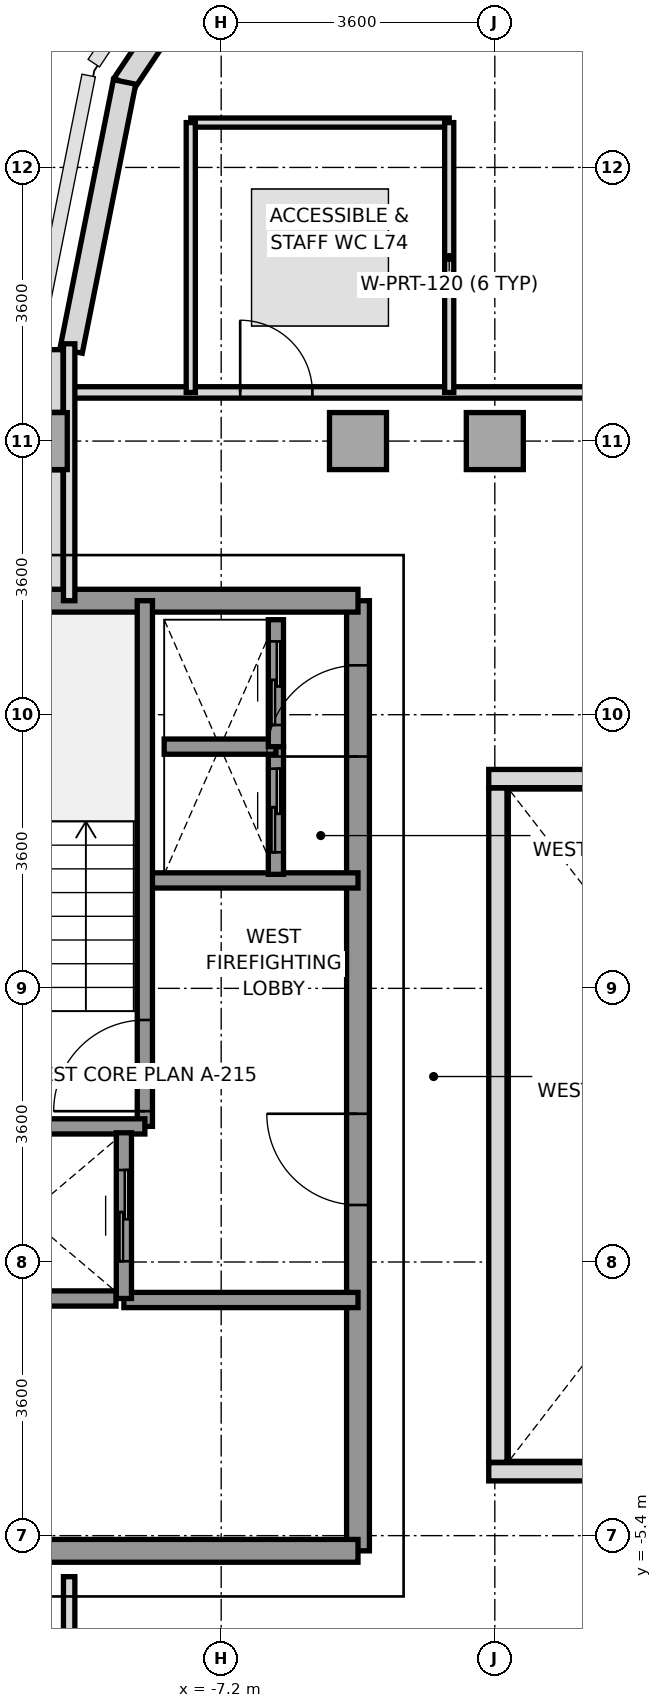
"""IFC4 building model, lengths in metres.
Left out: names, types, materials, properties, quantities, classifications, styles, units other than length and angle.
Written with IfcOpenShell. Run it as: python <this file> out.ifc"""

import sys

from ifc_helpers import new_model, si_unit, direction, frame, frame_2d, origin, origin_2d, place, context, subcontext, project, spatial, rectangle, extrude, source, transform, mapped, element, fill, save


model = new_model("IFC4")
c1 = context("Model", 3, precision=1e-05, world=origin(), true_north=direction((0.0, 1.0)))
c2 = subcontext(c1, "Body", "Model", "MODEL_VIEW")
j1 = project(units=[si_unit("LENGTHUNIT", "METRE"), si_unit("PLANEANGLEUNIT", "RADIAN")], contexts=[c1])
p1 = place(None, origin())
s1 = spatial("IfcSite", under=j1, at=p1, CompositionType="ELEMENT")
p2 = place(p1, origin())
s2 = spatial("IfcBuilding", under=s1, at=p2, CompositionType="ELEMENT")
p3 = place(p2, frame((0.0, 0.0, 265.2)))
s3 = spatial("IfcBuildingStorey", under=s2, at=p3, CompositionType="ELEMENT", Elevation=265.2)
m1 = source(origin(), c2, "Body", "SweptSolid", [
    extrude(rectangle(XDim=0.75, YDim=0.75, at=origin_2d()), origin(), (0.0, 0.0, 1.0), 3.01),
])
for number, where, z_axis, x_axis in (
    (1, (-9.6, 9.0, 0.0), (0.0, 0.0, 1.0), (1.0, 0.0, 0.0)),
    (2, (-5.4, 9.0, 0.0), (0.0, 0.0, 1.0), (1.0, 0.0, 0.0)),
    (3, (-3.6, 9.0, 0.0), (0.0, 0.0, 1.0), (1.0, 0.0, 0.0)),
):
    element("IfcColumn", number, at=place(p3, frame(where, z_axis=z_axis, x_axis=x_axis)), inside=s3, PredefinedType="COLUMN", context=c2, shape_type="MappedRepresentation", body=[
        mapped(m1, transform((0.0, 0.0, 0.0), x_axis=(1.0, 0.0, 0.0), y_axis=(0.0, 1.0, 0.0), z_axis=(0.0, 0.0, 1.0), scale=1.0)),
    ])
p4 = place(p3, frame((-7.305, 15.458, 0.0), z_axis=(0.0, 0.0, 1.0), x_axis=(-0.555604299396, -0.831446848868, 0.0)))
e4 = element("IfcWall", 4, at=p4, inside=s3, PredefinedType="SOLIDWALL", context=c2, shape_type="SweptSolid", body=[
    extrude(rectangle(XDim=2.118, YDim=0.3, at=frame_2d((1.059, 0.0))), origin(), (0.0, 0.0, 1.0), 2.61),
])
p5 = place(p3, frame((-8.471, 13.725, 0.0), z_axis=(0.0, 0.0, 1.0), x_axis=(-0.195114232679, -0.980780523974, 0.0)))
e5 = element("IfcWall", 5, at=p5, inside=s3, PredefinedType="SOLIDWALL", context=c2, shape_type="SweptSolid", body=[
    extrude(rectangle(XDim=3.609, YDim=0.3, at=frame_2d((1.804, 0.0))), origin(), (0.0, 0.0, 1.0), 3.01),
])
p6 = place(p3, frame((-9.4, 6.953, 0.0), z_axis=(0.0, 0.0, 1.0), x_axis=(0.0, 1.0, 0.0)))
e6 = element("IfcWall", 6, at=p6, inside=s3, PredefinedType="PARAPET", context=c2, shape_type="SweptSolid", body=[
    extrude(rectangle(XDim=1.669, YDim=0.24, at=frame_2d((0.834, 0.0))), origin(), (0.0, 0.0, 1.0), 1.15),
])
p7 = place(p3, frame((-9.4, 9.378, 0.0), z_axis=(0.0, 0.0, 1.0), x_axis=(0.0, 1.0, 0.0)))
e7 = element("IfcWall", 7, at=p7, inside=s3, PredefinedType="PARAPET", context=c2, shape_type="SweptSolid", body=[
    extrude(rectangle(XDim=0.825, YDim=0.24, at=frame_2d((0.413, 0.0))), origin(), (0.0, 0.0, 1.0), 1.15),
])
p8 = place(p3, frame((-5.4, -5.6, 0.0), z_axis=(0.0, 0.0, 1.0), x_axis=(0.0, 1.0, 0.0)))
e8 = element("IfcWall", 8, at=p8, inside=s3, PredefinedType="SHEAR", context=c2, shape_type="SweptSolid", body=[
    extrude(rectangle(XDim=12.5, YDim=0.3, at=frame_2d((6.25, 0.0))), origin(), (0.0, 0.0, 1.0), 3.01),
])
p9 = place(p8, frame((4.55, 0.0, 0.0)))
e9 = element("IfcOpeningElement", 9, at=p9, cuts=e8, PredefinedType="OPENING", context=c2, shape_type="SweptSolid", body=[
    extrude(rectangle(XDim=1.2, YDim=2.2, at=frame_2d((0.6, 1.1))), frame((0.0, 0.16, 0.0), z_axis=(0.0, -1.0, 0.0), x_axis=(1.0, 0.0, 0.0)), (0.0, 0.0, 1.0), 0.32),
])
p10 = place(p8, frame((10.45, 0.0, 0.0)))
e10 = element("IfcOpeningElement", 10, at=p10, cuts=e8, PredefinedType="OPENING", context=c2, shape_type="SweptSolid", body=[
    extrude(rectangle(XDim=1.2, YDim=2.2, at=frame_2d((0.6, 1.1))), frame((0.0, 0.16, 0.0), z_axis=(0.0, -1.0, 0.0), x_axis=(1.0, 0.0, 0.0)), (0.0, 0.0, 1.0), 0.32),
])
p11 = place(p3, frame((-11.356, 6.9, 0.0), z_axis=(0.0, 0.0, 1.0), x_axis=(1.0, 0.0, 0.0)))
e11 = element("IfcWall", 11, at=p11, inside=s3, PredefinedType="SHEAR", context=c2, shape_type="SweptSolid", body=[
    extrude(rectangle(XDim=5.956, YDim=0.3, at=frame_2d((2.978, 0.0))), origin(), (0.0, 0.0, 1.0), 3.01),
])
p12 = place(p3, frame((-13.2, -5.6, 0.0), z_axis=(0.0, 0.0, 1.0), x_axis=(1.0, 0.0, 0.0)))
e12 = element("IfcWall", 12, at=p12, inside=s3, PredefinedType="SHEAR", context=c2, shape_type="SweptSolid", body=[
    extrude(rectangle(XDim=7.8, YDim=0.3, at=frame_2d((3.9, 0.0))), origin(), (0.0, 0.0, 1.0), 3.01),
])
p13 = place(p3, frame((-8.18, 3.22, 0.0), z_axis=(0.0, 0.0, 1.0), x_axis=(1.0, 0.0, 0.0)))
e13 = element("IfcWall", 13, at=p13, inside=s3, PredefinedType="SOLIDWALL", context=c2, shape_type="SweptSolid", body=[
    extrude(rectangle(XDim=2.78, YDim=0.2, at=frame_2d((1.39, 0.0))), origin(), (0.0, 0.0, 1.0), 3.01),
])
p14 = place(p3, frame((-8.48, -2.3, 0.0), z_axis=(0.0, 0.0, 1.0), x_axis=(1.0, 0.0, 0.0)))
e14 = element("IfcWall", 14, at=p14, inside=s3, PredefinedType="SOLIDWALL", context=c2, shape_type="SweptSolid", body=[
    extrude(rectangle(XDim=3.08, YDim=0.2, at=frame_2d((1.54, 0.0))), origin(), (0.0, 0.0, 1.0), 3.01),
])
p15 = place(p3, frame((-8.204, -0.016, 0.0), z_axis=(0.0, 0.0, 1.0), x_axis=(0.0, 1.0, 0.0)))
e15 = element("IfcWall", 15, at=p15, inside=s3, PredefinedType="SOLIDWALL", context=c2, shape_type="SweptSolid", body=[
    extrude(rectangle(XDim=6.916, YDim=0.2, at=frame_2d((3.458, 0.0))), origin(), (0.0, 0.0, 1.0), 3.01),
])
p16 = place(p15, frame((0.2, 0.0, 0.0)))
e16 = element("IfcOpeningElement", 16, at=p16, cuts=e15, PredefinedType="OPENING", context=c2, shape_type="SweptSolid", body=[
    extrude(rectangle(XDim=1.2, YDim=2.2, at=frame_2d((0.6, 1.1))), frame((0.0, 0.11, 0.0), z_axis=(0.0, -1.0, 0.0), x_axis=(1.0, 0.0, 0.0)), (0.0, 0.0, 1.0), 0.22),
])
p17 = place(p3, frame((-11.356, -0.016, 0.0), z_axis=(0.0, 0.0, 1.0), x_axis=(1.0, 0.0, 0.0)))
e17 = element("IfcWall", 17, at=p17, inside=s3, PredefinedType="SOLIDWALL", context=c2, shape_type="SweptSolid", body=[
    extrude(rectangle(XDim=3.152, YDim=0.2, at=frame_2d((1.576, 0.0))), origin(), (0.0, 0.0, 1.0), 3.01),
])
p18 = place(p3, frame((-8.48, -2.28, 0.0), z_axis=(0.0, 0.0, 1.0), x_axis=(0.0, 1.0, 0.0)))
e18 = element("IfcWall", 18, at=p18, inside=s3, PredefinedType="SOLIDWALL", context=c2, shape_type="SweptSolid", body=[
    extrude(rectangle(XDim=2.18, YDim=0.2, at=frame_2d((1.09, 0.0))), origin(), (0.0, 0.0, 1.0), 3.01),
])
p19 = place(p18, frame((0.49, 0.0, 0.0)))
e19 = element("IfcOpeningElement", 19, at=p19, cuts=e18, PredefinedType="OPENING", context=c2, shape_type="SweptSolid", body=[
    extrude(rectangle(XDim=1.2, YDim=2.2, at=frame_2d((0.6, 1.1))), frame((0.0, 0.11, 0.0), z_axis=(0.0, -1.0, 0.0), x_axis=(1.0, 0.0, 0.0)), (0.0, 0.0, 1.0), 0.22),
])
p20 = place(p3, frame((-10.946, -2.28, 0.0), z_axis=(0.0, 0.0, 1.0), x_axis=(1.0, 0.0, 0.0)))
e20 = element("IfcWall", 20, at=p20, inside=s3, PredefinedType="SOLIDWALL", context=c2, shape_type="SweptSolid", body=[
    extrude(rectangle(XDim=2.362, YDim=0.2, at=frame_2d((1.181, 0.0))), origin(), (0.0, 0.0, 1.0), 3.01),
])
p21 = place(p3, frame((-6.48, 3.3, 0.0), z_axis=(0.0, 0.0, 1.0), x_axis=(0.0, 1.0, 0.0)))
e21 = element("IfcWall", 21, at=p21, inside=s3, PredefinedType="SOLIDWALL", context=c2, shape_type="SweptSolid", body=[
    extrude(rectangle(XDim=1.68, YDim=0.2, at=frame_2d((0.84, 0.0))), origin(), (0.0, 0.0, 1.0), 3.01),
])
p22 = place(p21, frame((0.29, 0.0, 0.0)))
e22 = element("IfcOpeningElement", 22, at=p22, cuts=e21, PredefinedType="OPENING", context=c2, shape_type="SweptSolid", body=[
    extrude(rectangle(XDim=1.1, YDim=2.2, at=frame_2d((0.55, 1.1))), frame((0.0, 0.11, 0.0), z_axis=(0.0, -1.0, 0.0), x_axis=(1.0, 0.0, 0.0)), (0.0, 0.0, 1.0), 0.22),
])
p23 = place(p3, frame((-7.95, 4.98, 0.0), z_axis=(0.0, 0.0, 1.0), x_axis=(1.0, 0.0, 0.0)))
e23 = element("IfcWall", 23, at=p23, inside=s3, PredefinedType="SOLIDWALL", context=c2, shape_type="SweptSolid", body=[
    extrude(rectangle(XDim=1.47, YDim=0.2, at=frame_2d((0.735, 0.0))), origin(), (0.0, 0.0, 1.0), 3.01),
])
p24 = place(p3, frame((-6.48, 4.98, 0.0), z_axis=(0.0, 0.0, 1.0), x_axis=(0.0, 1.0, 0.0)))
e24 = element("IfcWall", 24, at=p24, inside=s3, PredefinedType="SOLIDWALL", context=c2, shape_type="SweptSolid", body=[
    extrude(rectangle(XDim=1.67, YDim=0.2, at=frame_2d((0.835, 0.0))), origin(), (0.0, 0.0, 1.0), 3.01),
])
p25 = place(p24, frame((0.285, 0.0, 0.0)))
e25 = element("IfcOpeningElement", 25, at=p25, cuts=e24, PredefinedType="OPENING", context=c2, shape_type="SweptSolid", body=[
    extrude(rectangle(XDim=1.1, YDim=2.2, at=frame_2d((0.55, 1.1))), frame((0.0, 0.11, 0.0), z_axis=(0.0, -1.0, 0.0), x_axis=(1.0, 0.0, 0.0)), (0.0, 0.0, 1.0), 0.22),
])
p26 = place(p3, frame((-9.2, 9.64, 0.0), z_axis=(0.0, 0.0, 1.0), x_axis=(1.0, 0.0, 0.0)))
e26 = element("IfcWall", 26, at=p26, inside=s3, PredefinedType="PARTITIONING", context=c2, shape_type="SweptSolid", body=[
    extrude(rectangle(XDim=18.4, YDim=0.15, at=frame_2d((9.2, 0.0))), origin(), (0.0, 0.0, 1.0), 3.01),
])
p27 = place(p26, frame((2.25, 0.0, 0.0)))
e27 = element("IfcOpeningElement", 27, at=p27, cuts=e26, PredefinedType="OPENING", context=c2, shape_type="SweptSolid", body=[
    extrude(rectangle(XDim=0.95, YDim=2.15, at=frame_2d((0.475, 1.075))), frame((0.0, 0.085, 0.0), z_axis=(0.0, -1.0, 0.0), x_axis=(1.0, 0.0, 0.0)), (0.0, 0.0, 1.0), 0.17),
])
p28 = place(p26, frame((15.15, 0.0, 0.0)))
e28 = element("IfcOpeningElement", 28, at=p28, cuts=e26, PredefinedType="OPENING", context=c2, shape_type="SweptSolid", body=[
    extrude(rectangle(XDim=1.1, YDim=2.2, at=frame_2d((0.55, 1.1))), frame((0.0, 0.085, 0.0), z_axis=(0.0, -1.0, 0.0), x_axis=(1.0, 0.0, 0.0)), (0.0, 0.0, 1.0), 0.17),
])
p29 = place(p3, frame((-9.2, 6.9, 0.0), z_axis=(0.0, 0.0, 1.0), x_axis=(0.0, 1.0, 0.0)))
e29 = element("IfcWall", 29, at=p29, inside=s3, PredefinedType="PARTITIONING", context=c2, shape_type="SweptSolid", body=[
    extrude(rectangle(XDim=3.38, YDim=0.15, at=frame_2d((1.69, 0.0))), origin(), (0.0, 0.0, 1.0), 2.61),
])
p30 = place(p3, frame((-7.6, 13.19, 0.0), z_axis=(0.0, 0.0, 1.0), x_axis=(1.0, 0.0, 0.0)))
e30 = element("IfcWall", 30, at=p30, inside=s3, PredefinedType="PARTITIONING", context=c2, shape_type="SweptSolid", body=[
    extrude(rectangle(XDim=3.4, YDim=0.12, at=frame_2d((1.7, 0.0))), origin(), (0.0, 0.0, 1.0), 3.01),
])
for number, where, z_axis, x_axis in (
    (31, (-7.6, 9.64, 0.0), (0.0, 0.0, 1.0), (0.0, 1.0, 0.0)),
    (32, (-4.2, 9.64, 0.0), (0.0, 0.0, 1.0), (0.0, 1.0, 0.0)),
):
    element("IfcWall", number, at=place(p3, frame(where, z_axis=z_axis, x_axis=x_axis)), inside=s3, PredefinedType="PARTITIONING", context=c2, shape_type="SweptSolid", body=[
        extrude(rectangle(XDim=3.55, YDim=0.12, at=frame_2d((1.775, 0.0))), origin(), (0.0, 0.0, 1.0), 3.01),
    ])
p31 = place(p3, frame((-9.2, -10.28, 0.0), z_axis=(0.0, 0.0, 1.0), x_axis=(0.0, 1.0, 0.0)))
e33 = element("IfcWall", 33, at=p31, inside=s3, PredefinedType="PARTITIONING", context=c2, shape_type="SweptSolid", body=[
    extrude(rectangle(XDim=4.34, YDim=0.15, at=frame_2d((2.17, 0.0))), origin(), (0.0, 0.0, 1.0), 2.61),
])
for number, where, z_axis, x_axis in (
    (34, (-3.68, -4.56, 0.0), (0.0, 0.0, 1.0), (1.0, 0.0, 0.0)),
    (35, (-3.68, 4.56, 0.0), (0.0, 0.0, 1.0), (1.0, 0.0, 0.0)),
):
    element("IfcWall", number, at=place(p3, frame(where, z_axis=z_axis, x_axis=x_axis)), inside=s3, PredefinedType="PARAPET", context=c2, shape_type="SweptSolid", body=[
        extrude(rectangle(XDim=7.36, YDim=0.24, at=frame_2d((3.68, 0.0))), origin(), (0.0, 0.0, 1.0), 1.15),
    ])
p32 = place(p3, frame((-3.56, -4.435, 0.0), z_axis=(0.0, 0.0, 1.0), x_axis=(0.0, 1.0, 0.0)))
e36 = element("IfcWall", 36, at=p32, inside=s3, PredefinedType="PARAPET", context=c2, shape_type="SweptSolid", body=[
    extrude(rectangle(XDim=8.87, YDim=0.24, at=frame_2d((4.435, 0.0))), origin(), (0.0, 0.0, 1.0), 1.15),
])
m2 = source(origin(), c2, "Body", "SweptSolid", [
    extrude(rectangle(XDim=1.2, YDim=2.2, at=frame_2d((0.6, 1.1))), frame((0.0, 0.025, 0.0), z_axis=(0.0, -1.0, 0.0), x_axis=(1.0, 0.0, 0.0)), (0.0, 0.0, 1.0), 0.05),
])
p33 = place(p16, origin())
e37 = element("IfcDoor", 37, at=p33, inside=s3, OperationType="SINGLE_SWING_LEFT", PredefinedType="DOOR", context=c2, shape_type="MappedRepresentation", body=[
    mapped(m2, transform((0.0, 0.0, 0.0), x_axis=(1.0, 0.0, 0.0), y_axis=(0.0, 1.0, 0.0), z_axis=(0.0, 0.0, 1.0), scale=1.0)),
])
fill(e16, e37)
p34 = place(p9, origin())
e38 = element("IfcDoor", 38, at=p34, inside=s3, OperationType="SINGLE_SWING_RIGHT", PredefinedType="DOOR", context=c2, shape_type="MappedRepresentation", body=[
    mapped(m2, transform((0.0, 0.0, 0.0), x_axis=(1.0, 0.0, 0.0), y_axis=(0.0, 1.0, 0.0), z_axis=(0.0, 0.0, 1.0), scale=1.0)),
])
fill(e9, e38)
p35 = place(p10, origin())
e39 = element("IfcDoor", 39, at=p35, inside=s3, OperationType="SINGLE_SWING_LEFT", PredefinedType="DOOR", context=c2, shape_type="MappedRepresentation", body=[
    mapped(m2, transform((0.0, 0.0, 0.0), x_axis=(1.0, 0.0, 0.0), y_axis=(0.0, 1.0, 0.0), z_axis=(0.0, 0.0, 1.0), scale=1.0)),
])
fill(e10, e39)
p36 = place(p19, origin())
e40 = element("IfcDoor", 40, at=p36, inside=s3, OperationType="SLIDING_TO_RIGHT", PredefinedType="DOOR", context=c2, shape_type="MappedRepresentation", body=[
    mapped(m2, transform((0.0, 0.0, 0.0), x_axis=(1.0, 0.0, 0.0), y_axis=(0.0, 1.0, 0.0), z_axis=(0.0, 0.0, 1.0), scale=1.0)),
])
fill(e19, e40)
m3 = source(origin(), c2, "Body", "SweptSolid", [
    extrude(rectangle(XDim=1.1, YDim=2.2, at=frame_2d((0.55, 1.1))), frame((0.0, 0.025, 0.0), z_axis=(0.0, -1.0, 0.0), x_axis=(1.0, 0.0, 0.0)), (0.0, 0.0, 1.0), 0.05),
])
p37 = place(p22, origin())
e41 = element("IfcDoor", 41, at=p37, inside=s3, OperationType="SLIDING_TO_LEFT", PredefinedType="DOOR", context=c2, shape_type="MappedRepresentation", body=[
    mapped(m3, transform((0.0, 0.0, 0.0), x_axis=(1.0, 0.0, 0.0), y_axis=(0.0, 1.0, 0.0), z_axis=(0.0, 0.0, 1.0), scale=1.0)),
])
fill(e22, e41)
p38 = place(p25, origin())
e42 = element("IfcDoor", 42, at=p38, inside=s3, OperationType="SLIDING_TO_LEFT", PredefinedType="DOOR", context=c2, shape_type="MappedRepresentation", body=[
    mapped(m3, transform((0.0, 0.0, 0.0), x_axis=(1.0, 0.0, 0.0), y_axis=(0.0, 1.0, 0.0), z_axis=(0.0, 0.0, 1.0), scale=1.0)),
])
fill(e25, e42)
m4 = source(origin(), c2, "Body", "SweptSolid", [
    extrude(rectangle(XDim=0.95, YDim=2.15, at=frame_2d((0.475, 1.075))), frame((0.0, 0.025, 0.0), z_axis=(0.0, -1.0, 0.0), x_axis=(1.0, 0.0, 0.0)), (0.0, 0.0, 1.0), 0.05),
])
p39 = place(p27, origin())
e43 = element("IfcDoor", 43, at=p39, inside=s3, OperationType="SINGLE_SWING_LEFT", PredefinedType="DOOR", context=c2, shape_type="MappedRepresentation", body=[
    mapped(m4, transform((0.0, 0.0, 0.0), x_axis=(1.0, 0.0, 0.0), y_axis=(0.0, 1.0, 0.0), z_axis=(0.0, 0.0, 1.0), scale=1.0)),
])
fill(e27, e43)
save(model, sys.argv[1])
